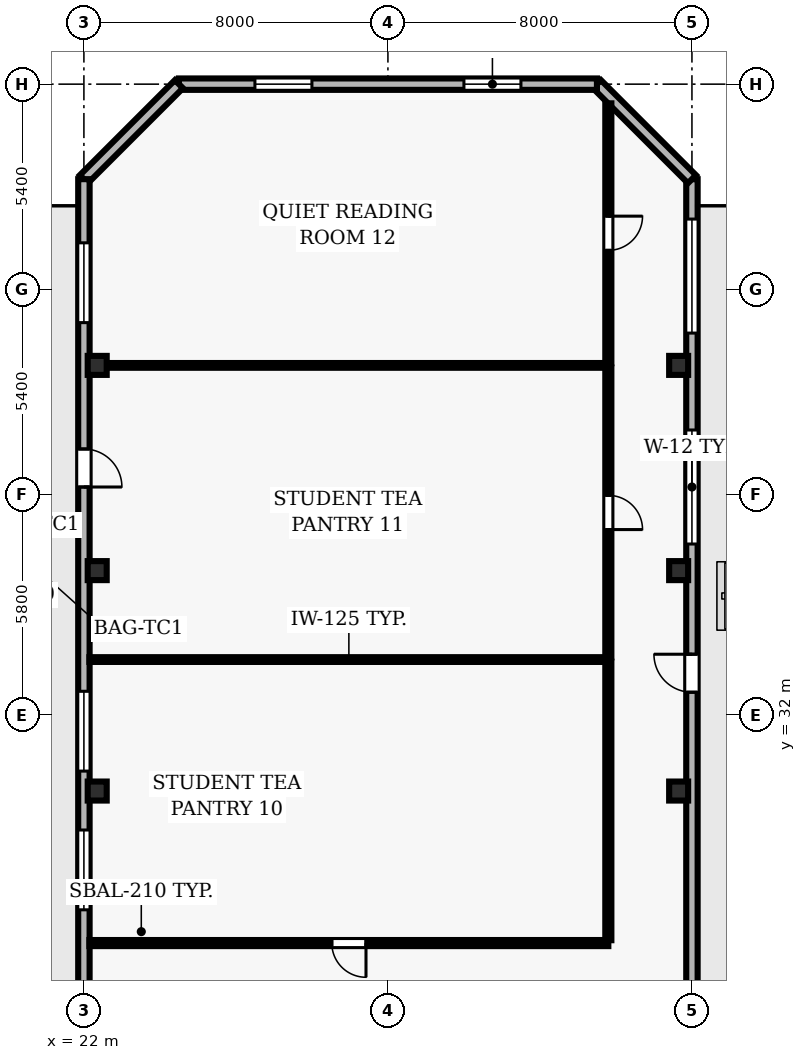
"""IFC4 building model, lengths in metres.
Left out: names, types, materials, properties, quantities, classifications, styles, units other than length and angle.
Written with IfcOpenShell. Run it as: python <this file> out.ifc"""

import sys

from ifc_helpers import new_model, si_unit, direction, frame, frame_2d, origin, origin_2d, place, context, subcontext, project, spatial, rectangle, hollow_rectangle, extrude, element, fill, save


model = new_model("IFC4")
c1 = context("Model", 3, precision=1e-05, world=origin(), true_north=direction((0.0, 1.0)))
c2 = subcontext(c1, "Body", "Model", "MODEL_VIEW")
j1 = project(units=[si_unit("LENGTHUNIT", "METRE"), si_unit("PLANEANGLEUNIT", "RADIAN")], contexts=[c1])
p1 = place(None, origin())
s1 = spatial("IfcSite", under=j1, at=p1, CompositionType="ELEMENT")
p2 = place(p1, origin())
s2 = spatial("IfcBuilding", under=s1, at=p2, CompositionType="ELEMENT")
p3 = place(p2, frame((0.0, 0.0, 161.9)))
s3 = spatial("IfcBuildingStorey", under=s2, at=p3, CompositionType="ELEMENT", Elevation=161.9)
for number, where, z_axis, x_axis in (
    (1, (22.35, 30.0, 0.0), (0.0, 0.0, 1.0), (1.0, 0.0, 0.0)),
    (2, (37.65, 30.0, 0.0), (0.0, 0.0, 1.0), (1.0, 0.0, 0.0)),
    (3, (22.35, 35.8, 0.0), (0.0, 0.0, 1.0), (1.0, 0.0, 0.0)),
    (4, (37.65, 35.8, 0.0), (0.0, 0.0, 1.0), (1.0, 0.0, 0.0)),
    (5, (22.35, 41.2, 0.0), (0.0, 0.0, 1.0), (1.0, 0.0, 0.0)),
    (6, (37.65, 41.2, 0.0), (0.0, 0.0, 1.0), (1.0, 0.0, 0.0)),
):
    element("IfcColumn", number, at=place(p3, frame(where, z_axis=z_axis, x_axis=x_axis)), inside=s3, PredefinedType="COLUMN", context=c2, shape_type="SweptSolid", body=[
        extrude(hollow_rectangle(XDim=0.5, YDim=0.5, WallThickness=0.025, at=origin_2d()), origin(), (0.0, 0.0, 1.0), 3.9),
    ])
p4 = place(p3, frame((38.0, 22.1, 0.0), z_axis=(0.0, 0.0, 1.0), x_axis=(0.0, 1.0, 0.0)))
e7 = element("IfcWall", 7, at=p4, inside=s3, PredefinedType="SOLIDWALL", context=c2, shape_type="SweptSolid", body=[
    extrude(rectangle(XDim=24.0, YDim=0.3, at=frame_2d((12.0, 0.0))), origin(), (0.0, 0.0, 1.0), 3.64),
])
p5 = place(p4, frame((10.5, 0.0, 0.0)))
e8 = element("IfcOpeningElement", 8, at=p5, cuts=e7, PredefinedType="OPENING", context=c2, shape_type="SweptSolid", body=[
    extrude(rectangle(XDim=1.0, YDim=2.2, at=frame_2d((0.5, 1.1))), frame((0.0, 0.16, 0.0), z_axis=(0.0, -1.0, 0.0), x_axis=(1.0, 0.0, 0.0)), (0.0, 0.0, 1.0), 0.32),
])
p6 = place(p4, frame((14.4, 0.0, 0.9)))
e9 = element("IfcOpeningElement", 9, at=p6, cuts=e7, PredefinedType="OPENING", context=c2, shape_type="SweptSolid", body=[
    extrude(rectangle(XDim=3.0, YDim=2.2, at=frame_2d((1.5, 1.1))), frame((0.0, 0.16, 0.0), z_axis=(0.0, -1.0, 0.0), x_axis=(1.0, 0.0, 0.0)), (0.0, 0.0, 1.0), 0.32),
])
p7 = place(p4, frame((19.95, 0.0, 0.9)))
e10 = element("IfcOpeningElement", 10, at=p7, cuts=e7, PredefinedType="OPENING", context=c2, shape_type="SweptSolid", body=[
    extrude(rectangle(XDim=3.0, YDim=2.2, at=frame_2d((1.5, 1.1))), frame((0.0, 0.16, 0.0), z_axis=(0.0, -1.0, 0.0), x_axis=(1.0, 0.0, 0.0)), (0.0, 0.0, 1.0), 0.32),
])
p8 = place(p3, frame((38.0, 46.1, 0.0), z_axis=(0.0, 0.0, 1.0), x_axis=(-0.707106781187, 0.707106781187, 0.0)))
e11 = element("IfcWall", 11, at=p8, inside=s3, PredefinedType="SOLIDWALL", context=c2, shape_type="SweptSolid", body=[
    extrude(rectangle(XDim=3.536, YDim=0.3, at=frame_2d((1.768, 0.0))), origin(), (0.0, 0.0, 1.0), 3.64),
])
p9 = place(p3, frame((35.5, 48.6, 0.0), z_axis=(0.0, 0.0, 1.0), x_axis=(-1.0, 0.0, 0.0)))
e12 = element("IfcWall", 12, at=p9, inside=s3, PredefinedType="SOLIDWALL", context=c2, shape_type="SweptSolid", body=[
    extrude(rectangle(XDim=11.0, YDim=0.3, at=frame_2d((5.5, 0.0))), origin(), (0.0, 0.0, 1.0), 3.64),
])
p10 = place(p9, frame((2.0, 0.0, 0.9)))
e13 = element("IfcOpeningElement", 13, at=p10, cuts=e12, PredefinedType="OPENING", context=c2, shape_type="SweptSolid", body=[
    extrude(rectangle(XDim=1.5, YDim=1.6, at=frame_2d((0.75, 0.8))), frame((0.0, 0.16, 0.0), z_axis=(0.0, -1.0, 0.0), x_axis=(1.0, 0.0, 0.0)), (0.0, 0.0, 1.0), 0.32),
])
p11 = place(p9, frame((7.5, 0.0, 0.9)))
e14 = element("IfcOpeningElement", 14, at=p11, cuts=e12, PredefinedType="OPENING", context=c2, shape_type="SweptSolid", body=[
    extrude(rectangle(XDim=1.5, YDim=1.6, at=frame_2d((0.75, 0.8))), frame((0.0, 0.16, 0.0), z_axis=(0.0, -1.0, 0.0), x_axis=(1.0, 0.0, 0.0)), (0.0, 0.0, 1.0), 0.32),
])
p12 = place(p3, frame((24.5, 48.6, 0.0), z_axis=(0.0, 0.0, 1.0), x_axis=(-0.707106781187, -0.707106781187, 0.0)))
e15 = element("IfcWall", 15, at=p12, inside=s3, PredefinedType="SOLIDWALL", context=c2, shape_type="SweptSolid", body=[
    extrude(rectangle(XDim=3.536, YDim=0.3, at=frame_2d((1.768, 0.0))), origin(), (0.0, 0.0, 1.0), 3.64),
])
p13 = place(p3, frame((22.0, 46.1, 0.0), z_axis=(0.0, 0.0, 1.0), x_axis=(0.0, -1.0, 0.0)))
e16 = element("IfcWall", 16, at=p13, inside=s3, PredefinedType="SOLIDWALL", context=c2, shape_type="SweptSolid", body=[
    extrude(rectangle(XDim=43.6, YDim=0.3, at=frame_2d((21.8, 0.0))), origin(), (0.0, 0.0, 1.0), 3.64),
])
p14 = place(p13, frame((7.1, 0.0, 0.0)))
e17 = element("IfcOpeningElement", 17, at=p14, cuts=e16, PredefinedType="OPENING", context=c2, shape_type="SweptSolid", body=[
    extrude(rectangle(XDim=1.0, YDim=2.2, at=frame_2d((0.5, 1.1))), frame((0.0, 0.16, 0.0), z_axis=(0.0, -1.0, 0.0), x_axis=(1.0, 0.0, 0.0)), (0.0, 0.0, 1.0), 0.32),
])
p15 = place(p13, frame((1.675, 0.0, 0.9)))
e18 = element("IfcOpeningElement", 18, at=p15, cuts=e16, PredefinedType="OPENING", context=c2, shape_type="SweptSolid", body=[
    extrude(rectangle(XDim=2.1, YDim=1.6, at=frame_2d((1.05, 0.8))), frame((0.0, 0.16, 0.0), z_axis=(0.0, -1.0, 0.0), x_axis=(1.0, 0.0, 0.0)), (0.0, 0.0, 1.0), 0.32),
])
p16 = place(p13, frame((13.475, 0.0, 0.9)))
e19 = element("IfcOpeningElement", 19, at=p16, cuts=e16, PredefinedType="OPENING", context=c2, shape_type="SweptSolid", body=[
    extrude(rectangle(XDim=2.1, YDim=1.6, at=frame_2d((1.05, 0.8))), frame((0.0, 0.16, 0.0), z_axis=(0.0, -1.0, 0.0), x_axis=(1.0, 0.0, 0.0)), (0.0, 0.0, 1.0), 0.32),
])
p17 = place(p13, frame((17.125, 0.0, 0.9)))
e20 = element("IfcOpeningElement", 20, at=p17, cuts=e16, PredefinedType="OPENING", context=c2, shape_type="SweptSolid", body=[
    extrude(rectangle(XDim=2.1, YDim=1.6, at=frame_2d((1.05, 0.8))), frame((0.0, 0.16, 0.0), z_axis=(0.0, -1.0, 0.0), x_axis=(1.0, 0.0, 0.0)), (0.0, 0.0, 1.0), 0.32),
])
p18 = place(p13, frame((23.475, 0.0, 0.9)))
e21 = element("IfcOpeningElement", 21, at=p18, cuts=e16, PredefinedType="OPENING", context=c2, shape_type="SweptSolid", body=[
    extrude(rectangle(XDim=2.1, YDim=1.6, at=frame_2d((1.05, 0.8))), frame((0.0, 0.16, 0.0), z_axis=(0.0, -1.0, 0.0), x_axis=(1.0, 0.0, 0.0)), (0.0, 0.0, 1.0), 0.32),
])
p19 = place(p13, frame((28.475, 0.0, 0.9)))
e22 = element("IfcOpeningElement", 22, at=p19, cuts=e16, PredefinedType="OPENING", context=c2, shape_type="SweptSolid", body=[
    extrude(rectangle(XDim=2.1, YDim=1.6, at=frame_2d((1.05, 0.8))), frame((0.0, 0.16, 0.0), z_axis=(0.0, -1.0, 0.0), x_axis=(1.0, 0.0, 0.0)), (0.0, 0.0, 1.0), 0.32),
])
p20 = place(p13, frame((34.375, 0.0, 0.9)))
e23 = element("IfcOpeningElement", 23, at=p20, cuts=e16, PredefinedType="OPENING", context=c2, shape_type="SweptSolid", body=[
    extrude(rectangle(XDim=2.1, YDim=1.6, at=frame_2d((1.05, 0.8))), frame((0.0, 0.16, 0.0), z_axis=(0.0, -1.0, 0.0), x_axis=(1.0, 0.0, 0.0)), (0.0, 0.0, 1.0), 0.32),
])
p21 = place(p3, frame((35.8, 26.0, 0.0), z_axis=(0.0, 0.0, 1.0), x_axis=(-1.0, 0.0, 0.0)))
e24 = element("IfcWall", 24, at=p21, inside=s3, PredefinedType="PARTITIONING", context=c2, shape_type="SweptSolid", body=[
    extrude(rectangle(XDim=13.655, YDim=0.16, at=frame_2d((6.828, 0.0))), origin(), (0.0, 0.0, 1.0), 3.64),
])
p22 = place(p21, frame((6.377, 0.0, 0.0)))
e25 = element("IfcOpeningElement", 25, at=p22, cuts=e24, PredefinedType="OPENING", context=c2, shape_type="SweptSolid", body=[
    extrude(rectangle(XDim=0.9, YDim=2.1, at=frame_2d((0.45, 1.05))), frame((0.0, 0.09, 0.0), z_axis=(0.0, -1.0, 0.0), x_axis=(1.0, 0.0, 0.0)), (0.0, 0.0, 1.0), 0.18),
])
p23 = place(p3, frame((35.8, 33.46, 0.0), z_axis=(0.0, 0.0, 1.0), x_axis=(-1.0, 0.0, 0.0)))
e26 = element("IfcWall", 26, at=p23, inside=s3, PredefinedType="PARTITIONING", context=c2, shape_type="SweptSolid", body=[
    extrude(rectangle(XDim=13.655, YDim=0.125, at=frame_2d((6.828, 0.0))), origin(), (0.0, 0.0, 1.0), 3.64),
])
p24 = place(p3, frame((35.8, 41.2, 0.0), z_axis=(0.0, 0.0, 1.0), x_axis=(-1.0, 0.0, 0.0)))
e27 = element("IfcWall", 27, at=p24, inside=s3, PredefinedType="PARTITIONING", context=c2, shape_type="SweptSolid", body=[
    extrude(rectangle(XDim=13.655, YDim=0.125, at=frame_2d((6.828, 0.0))), origin(), (0.0, 0.0, 1.0), 3.023),
])
p25 = place(p3, frame((35.8, 33.403, 0.0), z_axis=(0.0, 0.0, 1.0), x_axis=(0.0, -1.0, 0.0)))
e28 = element("IfcWall", 28, at=p25, inside=s3, PredefinedType="PARTITIONING", context=c2, shape_type="SweptSolid", body=[
    extrude(rectangle(XDim=7.328, YDim=0.16, at=frame_2d((3.664, 0.0))), origin(), (0.0, 0.0, 1.0), 3.64),
])
p26 = place(p3, frame((35.8, 41.143, 0.0), z_axis=(0.0, 0.0, 1.0), x_axis=(0.0, -1.0, 0.0)))
e29 = element("IfcWall", 29, at=p26, inside=s3, PredefinedType="PARTITIONING", context=c2, shape_type="SweptSolid", body=[
    extrude(rectangle(XDim=7.626, YDim=0.16, at=frame_2d((3.813, 0.0))), origin(), (0.0, 0.0, 1.0), 3.64),
])
p27 = place(p26, frame((3.363, 0.0, 0.0)))
e30 = element("IfcOpeningElement", 30, at=p27, cuts=e29, PredefinedType="OPENING", context=c2, shape_type="SweptSolid", body=[
    extrude(rectangle(XDim=0.9, YDim=2.1, at=frame_2d((0.45, 1.05))), frame((0.0, 0.09, 0.0), z_axis=(0.0, -1.0, 0.0), x_axis=(1.0, 0.0, 0.0)), (0.0, 0.0, 1.0), 0.18),
])
p28 = place(p3, frame((35.8, 48.095, 0.0), z_axis=(0.0, 0.0, 1.0), x_axis=(0.0, -1.0, 0.0)))
e31 = element("IfcWall", 31, at=p28, inside=s3, PredefinedType="PARTITIONING", context=c2, shape_type="SweptSolid", body=[
    extrude(rectangle(XDim=6.837, YDim=0.16, at=frame_2d((3.418, 0.0))), origin(), (0.0, 0.0, 1.0), 3.64),
])
p29 = place(p28, frame((2.968, 0.0, 0.0)))
e32 = element("IfcOpeningElement", 32, at=p29, cuts=e31, PredefinedType="OPENING", context=c2, shape_type="SweptSolid", body=[
    extrude(rectangle(XDim=0.9, YDim=2.1, at=frame_2d((0.45, 1.05))), frame((0.0, 0.09, 0.0), z_axis=(0.0, -1.0, 0.0), x_axis=(1.0, 0.0, 0.0)), (0.0, 0.0, 1.0), 0.18),
])
p30 = place(p5, origin())
e33 = element("IfcDoor", 33, at=p30, inside=s3, OperationType="SINGLE_SWING_RIGHT", PredefinedType="DOOR", context=c2, shape_type="SweptSolid", body=[
    extrude(rectangle(XDim=1.0, YDim=2.2, at=frame_2d((0.5, 1.1))), frame((0.0, 0.025, 0.0), z_axis=(0.0, -1.0, 0.0), x_axis=(1.0, 0.0, 0.0)), (0.0, 0.0, 1.0), 0.05),
])
fill(e8, e33)
p31 = place(p6, origin())
e34 = element("IfcWindow", 34, at=p31, inside=s3, PartitioningType="SINGLE_PANEL", PredefinedType="WINDOW", context=c2, shape_type="SweptSolid", body=[
    extrude(rectangle(XDim=3.0, YDim=2.2, at=frame_2d((1.5, 1.1))), frame((0.0, 0.03, 0.0), z_axis=(0.0, -1.0, 0.0), x_axis=(1.0, 0.0, 0.0)), (0.0, 0.0, 1.0), 0.06),
])
fill(e9, e34)
p32 = place(p7, origin())
e35 = element("IfcWindow", 35, at=p32, inside=s3, PartitioningType="SINGLE_PANEL", PredefinedType="WINDOW", context=c2, shape_type="SweptSolid", body=[
    extrude(rectangle(XDim=3.0, YDim=2.2, at=frame_2d((1.5, 1.1))), frame((0.0, 0.03, 0.0), z_axis=(0.0, -1.0, 0.0), x_axis=(1.0, 0.0, 0.0)), (0.0, 0.0, 1.0), 0.06),
])
fill(e10, e35)
p33 = place(p10, origin())
e36 = element("IfcWindow", 36, at=p33, inside=s3, PartitioningType="SINGLE_PANEL", PredefinedType="WINDOW", context=c2, shape_type="SweptSolid", body=[
    extrude(rectangle(XDim=1.5, YDim=1.6, at=frame_2d((0.75, 0.8))), frame((0.0, 0.03, 0.0), z_axis=(0.0, -1.0, 0.0), x_axis=(1.0, 0.0, 0.0)), (0.0, 0.0, 1.0), 0.06),
])
fill(e13, e36)
p34 = place(p11, origin())
e37 = element("IfcWindow", 37, at=p34, inside=s3, PartitioningType="SINGLE_PANEL", PredefinedType="WINDOW", context=c2, shape_type="SweptSolid", body=[
    extrude(rectangle(XDim=1.5, YDim=1.6, at=frame_2d((0.75, 0.8))), frame((0.0, 0.03, 0.0), z_axis=(0.0, -1.0, 0.0), x_axis=(1.0, 0.0, 0.0)), (0.0, 0.0, 1.0), 0.06),
])
fill(e14, e37)
p35 = place(p14, origin())
e38 = element("IfcDoor", 38, at=p35, inside=s3, OperationType="SINGLE_SWING_RIGHT", PredefinedType="DOOR", context=c2, shape_type="SweptSolid", body=[
    extrude(rectangle(XDim=1.0, YDim=2.2, at=frame_2d((0.5, 1.1))), frame((0.0, 0.025, 0.0), z_axis=(0.0, -1.0, 0.0), x_axis=(1.0, 0.0, 0.0)), (0.0, 0.0, 1.0), 0.05),
])
fill(e17, e38)
p36 = place(p15, origin())
e39 = element("IfcWindow", 39, at=p36, inside=s3, PartitioningType="SINGLE_PANEL", PredefinedType="WINDOW", context=c2, shape_type="SweptSolid", body=[
    extrude(rectangle(XDim=2.1, YDim=1.6, at=frame_2d((1.05, 0.8))), frame((0.0, 0.03, 0.0), z_axis=(0.0, -1.0, 0.0), x_axis=(1.0, 0.0, 0.0)), (0.0, 0.0, 1.0), 0.06),
])
fill(e18, e39)
p37 = place(p16, origin())
e40 = element("IfcWindow", 40, at=p37, inside=s3, PartitioningType="SINGLE_PANEL", PredefinedType="WINDOW", context=c2, shape_type="SweptSolid", body=[
    extrude(rectangle(XDim=2.1, YDim=1.6, at=frame_2d((1.05, 0.8))), frame((0.0, 0.03, 0.0), z_axis=(0.0, -1.0, 0.0), x_axis=(1.0, 0.0, 0.0)), (0.0, 0.0, 1.0), 0.06),
])
fill(e19, e40)
p38 = place(p17, origin())
e41 = element("IfcWindow", 41, at=p38, inside=s3, PartitioningType="SINGLE_PANEL", PredefinedType="WINDOW", context=c2, shape_type="SweptSolid", body=[
    extrude(rectangle(XDim=2.1, YDim=1.6, at=frame_2d((1.05, 0.8))), frame((0.0, 0.03, 0.0), z_axis=(0.0, -1.0, 0.0), x_axis=(1.0, 0.0, 0.0)), (0.0, 0.0, 1.0), 0.06),
])
fill(e20, e41)
p39 = place(p22, origin())
e42 = element("IfcDoor", 42, at=p39, inside=s3, OperationType="SINGLE_SWING_LEFT", PredefinedType="DOOR", context=c2, shape_type="SweptSolid", body=[
    extrude(rectangle(XDim=0.9, YDim=2.1, at=frame_2d((0.45, 1.05))), frame((0.0, 0.025, 0.0), z_axis=(0.0, -1.0, 0.0), x_axis=(1.0, 0.0, 0.0)), (0.0, 0.0, 1.0), 0.05),
])
fill(e25, e42)
p40 = place(p27, origin())
e43 = element("IfcDoor", 43, at=p40, inside=s3, OperationType="SINGLE_SWING_RIGHT", PredefinedType="DOOR", context=c2, shape_type="SweptSolid", body=[
    extrude(rectangle(XDim=0.9, YDim=2.1, at=frame_2d((0.45, 1.05))), frame((0.0, 0.025, 0.0), z_axis=(0.0, -1.0, 0.0), x_axis=(1.0, 0.0, 0.0)), (0.0, 0.0, 1.0), 0.05),
])
fill(e30, e43)
p41 = place(p29, origin())
e44 = element("IfcDoor", 44, at=p41, inside=s3, OperationType="SINGLE_SWING_LEFT", PredefinedType="DOOR", context=c2, shape_type="SweptSolid", body=[
    extrude(rectangle(XDim=0.9, YDim=2.1, at=frame_2d((0.45, 1.05))), frame((0.0, 0.025, 0.0), z_axis=(0.0, -1.0, 0.0), x_axis=(1.0, 0.0, 0.0)), (0.0, 0.0, 1.0), 0.05),
])
fill(e32, e44)
save(model, sys.argv[1])
